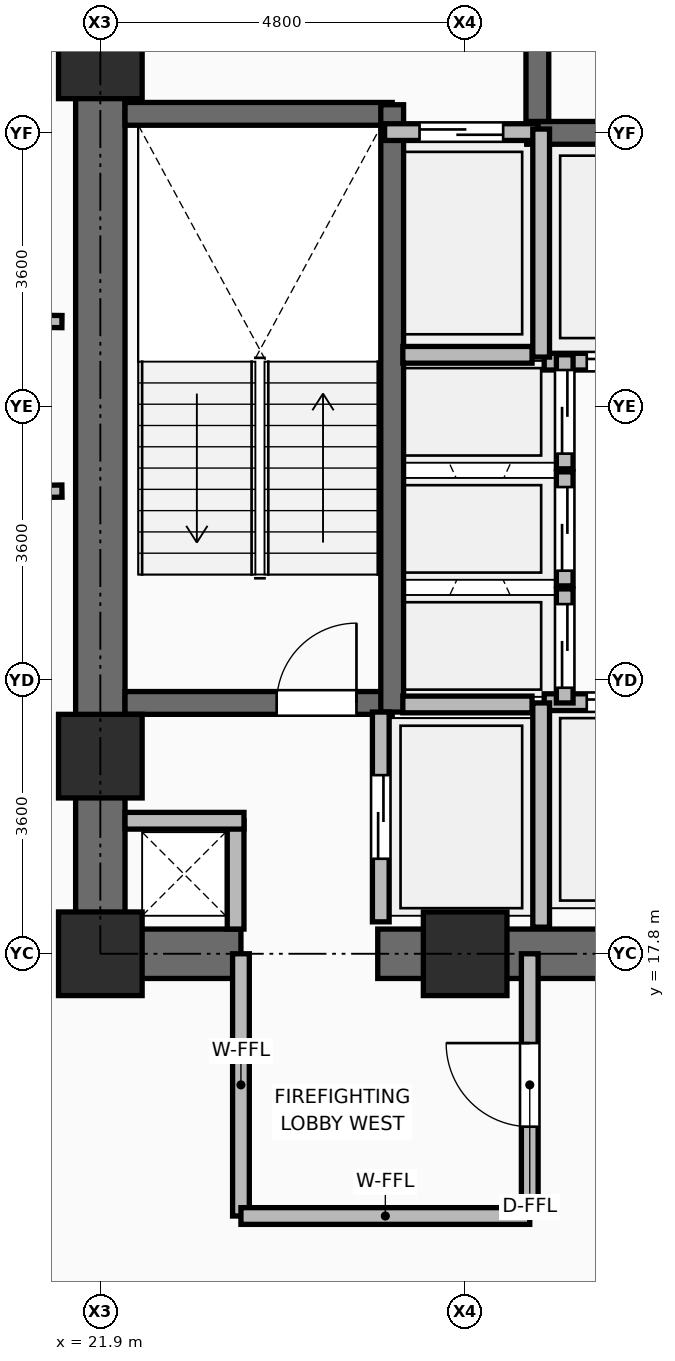
"""IFC4 building model, lengths in metres.
Left out: names, types, materials, properties, quantities, classifications, styles, units other than length and angle.
Written with IfcOpenShell. Run it as: python <this file> out.ifc"""

import sys

from ifc_helpers import new_model, si_unit, direction, frame, frame_2d, origin, origin_2d, place, context, subcontext, project, spatial, rectangle, extrude, element, fill, save


model = new_model("IFC4")
c1 = context("Model", 3, precision=1e-05, world=origin(), true_north=direction((0.0, 1.0)))
c2 = subcontext(c1, "Body", "Model", "MODEL_VIEW")
j1 = project(units=[si_unit("LENGTHUNIT", "METRE"), si_unit("PLANEANGLEUNIT", "RADIAN")], contexts=[c1])
p1 = place(None, origin())
s1 = spatial("IfcSite", under=j1, at=p1, CompositionType="ELEMENT")
p2 = place(p1, origin())
s2 = spatial("IfcBuilding", under=s1, at=p2, CompositionType="ELEMENT")
p3 = place(p2, frame((0.0, 0.0, 72.0)))
s3 = spatial("IfcBuildingStorey", under=s2, at=p3, CompositionType="ELEMENT", Elevation=72.0)
for number, where, z_axis, x_axis in (
    (1, (21.9, 17.8, 0.0), (0.0, 0.0, 1.0), (1.0, 0.0, 0.0)),
    (2, (26.7, 17.8, 0.0), (0.0, 0.0, 1.0), (1.0, 0.0, 0.0)),
    (3, (21.9, 20.4, 0.0), (0.0, 0.0, 1.0), (1.0, 0.0, 0.0)),
    (4, (21.9, 29.6, 0.0), (0.0, 0.0, 1.0), (1.0, 0.0, 0.0)),
):
    element("IfcColumn", number, at=place(p3, frame(where, z_axis=z_axis, x_axis=x_axis)), inside=s3, PredefinedType="COLUMN", context=c2, shape_type="SweptSolid", body=[
        extrude(rectangle(XDim=1.1, YDim=1.1, at=origin_2d()), origin(), (0.0, 0.0, 1.0), 3.75),
    ])
p4 = place(p3, frame((21.575, 17.8, 0.0), z_axis=(0.0, 0.0, 1.0), x_axis=(1.0, 0.0, 0.0)))
e5 = element("IfcWall", 5, at=p4, inside=s3, PredefinedType="SHEAR", context=c2, shape_type="SweptSolid", body=[
    extrude(rectangle(XDim=2.175, YDim=0.65, at=frame_2d((1.087, 0.0))), origin(), (0.0, 0.0, 1.0), 3.57),
])
p5 = place(p3, frame((25.55, 17.8, 0.0), z_axis=(0.0, 0.0, 1.0), x_axis=(1.0, 0.0, 0.0)))
e6 = element("IfcWall", 6, at=p5, inside=s3, PredefinedType="SHEAR", context=c2, shape_type="SweptSolid", body=[
    extrude(rectangle(XDim=6.9, YDim=0.65, at=frame_2d((3.45, 0.0))), origin(), (0.0, 0.0, 1.0), 3.57),
])
p6 = place(p3, frame((21.9, 18.125, 0.0), z_axis=(0.0, 0.0, 1.0), x_axis=(0.0, 1.0, 0.0)))
e7 = element("IfcWall", 7, at=p6, inside=s3, PredefinedType="SHEAR", context=c2, shape_type="SweptSolid", body=[
    extrude(rectangle(XDim=14.0, YDim=0.65, at=frame_2d((7.0, 0.0))), origin(), (0.0, 0.0, 1.0), 3.57),
])
p7 = place(p3, frame((22.225, 21.1, 0.0), z_axis=(0.0, 0.0, 1.0), x_axis=(1.0, 0.0, 0.0)))
e8 = element("IfcWall", 8, at=p7, inside=s3, PredefinedType="SHEAR", context=c2, shape_type="SweptSolid", body=[
    extrude(rectangle(XDim=3.515, YDim=0.3, at=frame_2d((1.757, 0.0))), origin(), (0.0, 0.0, 1.0), 3.57),
])
p8 = place(p7, frame((1.995, 0.0, 0.0)))
e9 = element("IfcOpeningElement", 9, at=p8, cuts=e8, PredefinedType="OPENING", context=c2, shape_type="SweptSolid", body=[
    extrude(rectangle(XDim=1.05, YDim=2.1, at=frame_2d((0.525, 1.05))), frame((0.0, 0.16, 0.0), z_axis=(0.0, -1.0, 0.0), x_axis=(1.0, 0.0, 0.0)), (0.0, 0.0, 1.0), 0.32),
])
p9 = place(p3, frame((22.225, 28.85, 0.0), z_axis=(0.0, 0.0, 1.0), x_axis=(1.0, 0.0, 0.0)))
e10 = element("IfcWall", 10, at=p9, inside=s3, PredefinedType="SHEAR", context=c2, shape_type="SweptSolid", body=[
    extrude(rectangle(XDim=3.515, YDim=0.3, at=frame_2d((1.757, 0.0))), origin(), (0.0, 0.0, 1.0), 3.57),
])
p10 = place(p3, frame((25.74, 20.98, 0.0), z_axis=(0.0, 0.0, 1.0), x_axis=(0.0, 1.0, 0.0)))
e11 = element("IfcWall", 11, at=p10, inside=s3, PredefinedType="SHEAR", context=c2, shape_type="SweptSolid", body=[
    extrude(rectangle(XDim=7.99, YDim=0.3, at=frame_2d((3.995, 0.0))), origin(), (0.0, 0.0, 1.0), 3.57),
])
p11 = place(p3, frame((27.51, 28.6, 0.0), z_axis=(0.0, 0.0, 1.0), x_axis=(1.0, 0.0, 0.0)))
e12 = element("IfcWall", 12, at=p11, inside=s3, PredefinedType="SHEAR", context=c2, shape_type="SweptSolid", body=[
    extrude(rectangle(XDim=8.03, YDim=0.3, at=frame_2d((4.015, 0.0))), origin(), (0.0, 0.0, 1.0), 3.57),
])
p12 = place(p3, frame((27.65, 28.75, 0.0), z_axis=(0.0, 0.0, 1.0), x_axis=(0.0, 1.0, 0.0)))
e13 = element("IfcWall", 13, at=p12, inside=s3, PredefinedType="SHEAR", context=c2, shape_type="SweptSolid", body=[
    extrude(rectangle(XDim=3.375, YDim=0.3, at=frame_2d((1.688, 0.0))), origin(), (0.0, 0.0, 1.0), 3.57),
])
p13 = place(p12, frame((1.0, 0.0, 0.0)))
e14 = element("IfcOpeningElement", 14, at=p13, cuts=e13, PredefinedType="OPENING", context=c2, shape_type="SweptSolid", body=[
    extrude(rectangle(XDim=1.05, YDim=2.1, at=frame_2d((0.525, 1.05))), frame((0.0, 0.16, 0.0), z_axis=(0.0, -1.0, 0.0), x_axis=(1.0, 0.0, 0.0)), (0.0, 0.0, 1.0), 0.32),
])
p14 = place(p3, frame((23.68, 18.125, 0.0), z_axis=(0.0, 0.0, 1.0), x_axis=(0.0, 1.0, 0.0)))
e15 = element("IfcWall", 15, at=p14, inside=s3, PredefinedType="PARTITIONING", context=c2, shape_type="SweptSolid", body=[
    extrude(rectangle(XDim=1.425, YDim=0.22, at=frame_2d((0.712, 0.0))), origin(), (0.0, 0.0, 1.0), 3.55),
])
p15 = place(p3, frame((22.225, 19.55, 0.0), z_axis=(0.0, 0.0, 1.0), x_axis=(1.0, 0.0, 0.0)))
e16 = element("IfcWall", 16, at=p15, inside=s3, PredefinedType="PARTITIONING", context=c2, shape_type="SweptSolid", body=[
    extrude(rectangle(XDim=1.565, YDim=0.22, at=frame_2d((0.782, 0.0))), origin(), (0.0, 0.0, 1.0), 2.595),
])
p16 = place(p3, frame((25.59, 18.22, 0.0), z_axis=(0.0, 0.0, 1.0), x_axis=(0.0, 1.0, 0.0)))
e17 = element("IfcWall", 17, at=p16, inside=s3, PredefinedType="PARTITIONING", context=c2, shape_type="SweptSolid", body=[
    extrude(rectangle(XDim=2.76, YDim=0.22, at=frame_2d((1.38, 0.0))), origin(), (0.0, 0.0, 1.0), 3.55),
])
p17 = place(p16, frame((0.83, 0.0, 0.0)))
e18 = element("IfcOpeningElement", 18, at=p17, cuts=e17, PredefinedType="OPENING", context=c2, shape_type="SweptSolid", body=[
    extrude(rectangle(XDim=1.1, YDim=2.2, at=frame_2d((0.55, 1.1))), frame((0.0, 0.12, 0.0), z_axis=(0.0, -1.0, 0.0), x_axis=(1.0, 0.0, 0.0)), (0.0, 0.0, 1.0), 0.24),
])
p18 = place(p3, frame((25.64, 28.61, 0.0), z_axis=(0.0, 0.0, 1.0), x_axis=(1.0, 0.0, 0.0)))
e19 = element("IfcWall", 19, at=p18, inside=s3, PredefinedType="PARTITIONING", context=c2, shape_type="SweptSolid", body=[
    extrude(rectangle(XDim=2.02, YDim=0.22, at=frame_2d((1.01, 0.0))), origin(), (0.0, 0.0, 1.0), 3.55),
])
p19 = place(p18, frame((0.46, 0.0, 0.0)))
e20 = element("IfcOpeningElement", 20, at=p19, cuts=e19, PredefinedType="OPENING", context=c2, shape_type="SweptSolid", body=[
    extrude(rectangle(XDim=1.1, YDim=2.2, at=frame_2d((0.55, 1.1))), frame((0.0, 0.12, 0.0), z_axis=(0.0, -1.0, 0.0), x_axis=(1.0, 0.0, 0.0)), (0.0, 0.0, 1.0), 0.24),
])
p20 = place(p3, frame((27.74, 21.11, 0.0), z_axis=(0.0, 0.0, 1.0), x_axis=(1.0, 0.0, 0.0)))
e21 = element("IfcWall", 21, at=p20, inside=s3, PredefinedType="PARTITIONING", context=c2, shape_type="SweptSolid", body=[
    extrude(rectangle(XDim=2.22, YDim=0.22, at=frame_2d((1.11, 0.0))), origin(), (0.0, 0.0, 1.0), 3.55),
])
p21 = place(p20, frame((0.56, 0.0, 0.0)))
e22 = element("IfcOpeningElement", 22, at=p21, cuts=e21, PredefinedType="OPENING", context=c2, shape_type="SweptSolid", body=[
    extrude(rectangle(XDim=1.1, YDim=2.2, at=frame_2d((0.55, 1.1))), frame((0.0, 0.12, 0.0), z_axis=(0.0, -1.0, 0.0), x_axis=(1.0, 0.0, 0.0)), (0.0, 0.0, 1.0), 0.24),
])
p22 = place(p3, frame((27.74, 25.59, 0.0), z_axis=(0.0, 0.0, 1.0), x_axis=(1.0, 0.0, 0.0)))
e23 = element("IfcWall", 23, at=p22, inside=s3, PredefinedType="PARTITIONING", context=c2, shape_type="SweptSolid", body=[
    extrude(rectangle(XDim=2.22, YDim=0.22, at=frame_2d((1.11, 0.0))), origin(), (0.0, 0.0, 1.0), 3.55),
])
p23 = place(p22, frame((0.56, 0.0, 0.0)))
e24 = element("IfcOpeningElement", 24, at=p23, cuts=e23, PredefinedType="OPENING", context=c2, shape_type="SweptSolid", body=[
    extrude(rectangle(XDim=1.1, YDim=2.2, at=frame_2d((0.55, 1.1))), frame((0.0, 0.12, 0.0), z_axis=(0.0, -1.0, 0.0), x_axis=(1.0, 0.0, 0.0)), (0.0, 0.0, 1.0), 0.24),
])
p24 = place(p3, frame((28.01, 21.1, 0.0), z_axis=(0.0, 0.0, 1.0), x_axis=(0.0, 1.0, 0.0)))
e25 = element("IfcWall", 25, at=p24, inside=s3, PredefinedType="PARTITIONING", context=c2, shape_type="SweptSolid", body=[
    extrude(rectangle(XDim=1.5, YDim=0.22, at=frame_2d((0.75, 0.0))), origin(), (0.0, 0.0, 1.0), 3.55),
])
p25 = place(p24, frame((0.2, 0.0, 0.0)))
e26 = element("IfcOpeningElement", 26, at=p25, cuts=e25, PredefinedType="OPENING", context=c2, shape_type="SweptSolid", body=[
    extrude(rectangle(XDim=1.1, YDim=2.2, at=frame_2d((0.55, 1.1))), frame((0.0, 0.12, 0.0), z_axis=(0.0, -1.0, 0.0), x_axis=(1.0, 0.0, 0.0)), (0.0, 0.0, 1.0), 0.24),
])
p26 = place(p3, frame((28.01, 22.64, 0.0), z_axis=(0.0, 0.0, 1.0), x_axis=(0.0, 1.0, 0.0)))
e27 = element("IfcWall", 27, at=p26, inside=s3, PredefinedType="PARTITIONING", context=c2, shape_type="SweptSolid", body=[
    extrude(rectangle(XDim=1.5, YDim=0.22, at=frame_2d((0.75, 0.0))), origin(), (0.0, 0.0, 1.0), 3.55),
])
p27 = place(p26, frame((0.2, 0.0, 0.0)))
e28 = element("IfcOpeningElement", 28, at=p27, cuts=e27, PredefinedType="OPENING", context=c2, shape_type="SweptSolid", body=[
    extrude(rectangle(XDim=1.1, YDim=2.2, at=frame_2d((0.55, 1.1))), frame((0.0, 0.12, 0.0), z_axis=(0.0, -1.0, 0.0), x_axis=(1.0, 0.0, 0.0)), (0.0, 0.0, 1.0), 0.24),
])
p28 = place(p3, frame((28.01, 24.18, 0.0), z_axis=(0.0, 0.0, 1.0), x_axis=(0.0, 1.0, 0.0)))
e29 = element("IfcWall", 29, at=p28, inside=s3, PredefinedType="PARTITIONING", context=c2, shape_type="SweptSolid", body=[
    extrude(rectangle(XDim=1.5, YDim=0.22, at=frame_2d((0.75, 0.0))), origin(), (0.0, 0.0, 1.0), 3.55),
])
p29 = place(p28, frame((0.2, 0.0, 0.0)))
e30 = element("IfcOpeningElement", 30, at=p29, cuts=e29, PredefinedType="OPENING", context=c2, shape_type="SweptSolid", body=[
    extrude(rectangle(XDim=1.1, YDim=2.2, at=frame_2d((0.55, 1.1))), frame((0.0, 0.12, 0.0), z_axis=(0.0, -1.0, 0.0), x_axis=(1.0, 0.0, 0.0)), (0.0, 0.0, 1.0), 0.24),
])
p30 = place(p3, frame((27.7, 18.15, 0.0), z_axis=(0.0, 0.0, 1.0), x_axis=(0.0, 1.0, 0.0)))
e31 = element("IfcWall", 31, at=p30, inside=s3, PredefinedType="PARTITIONING", context=c2, shape_type="SweptSolid", body=[
    extrude(rectangle(XDim=2.95, YDim=0.22, at=frame_2d((1.475, 0.0))), origin(), (0.0, 0.0, 1.0), 3.55),
])
p31 = place(p3, frame((27.7, 25.65, 0.0), z_axis=(0.0, 0.0, 1.0), x_axis=(0.0, 1.0, 0.0)))
e32 = element("IfcWall", 32, at=p31, inside=s3, PredefinedType="PARTITIONING", context=c2, shape_type="SweptSolid", body=[
    extrude(rectangle(XDim=3.0, YDim=0.22, at=frame_2d((1.5, 0.0))), origin(), (0.0, 0.0, 1.0), 3.55),
])
for number, where, z_axis, x_axis in (
    (33, (25.88, 21.08, 0.0), (0.0, 0.0, 1.0), (1.0, 0.0, 0.0)),
    (34, (25.88, 25.68, 0.0), (0.0, 0.0, 1.0), (1.0, 0.0, 0.0)),
):
    element("IfcWall", number, at=place(p3, frame(where, z_axis=z_axis, x_axis=x_axis)), inside=s3, PredefinedType="PARTITIONING", context=c2, shape_type="SweptSolid", body=[
        extrude(rectangle(XDim=1.7, YDim=0.22, at=frame_2d((0.85, 0.0))), origin(), (0.0, 0.0, 1.0), 3.55),
    ])
p32 = place(p3, frame((23.75, 14.35, 0.0), z_axis=(0.0, 0.0, 1.0), x_axis=(0.0, 1.0, 0.0)))
e35 = element("IfcWall", 35, at=p32, inside=s3, PredefinedType="PARTITIONING", context=c2, shape_type="SweptSolid", body=[
    extrude(rectangle(XDim=3.45, YDim=0.22, at=frame_2d((1.725, 0.0))), origin(), (0.0, 0.0, 1.0), 2.928),
])
p33 = place(p3, frame((23.75, 14.35, 0.0), z_axis=(0.0, 0.0, 1.0), x_axis=(1.0, 0.0, 0.0)))
e36 = element("IfcWall", 36, at=p33, inside=s3, PredefinedType="PARTITIONING", context=c2, shape_type="SweptSolid", body=[
    extrude(rectangle(XDim=3.8, YDim=0.22, at=frame_2d((1.9, 0.0))), origin(), (0.0, 0.0, 1.0), 3.55),
])
p34 = place(p3, frame((27.55, 14.35, 0.0), z_axis=(0.0, 0.0, 1.0), x_axis=(0.0, 1.0, 0.0)))
e37 = element("IfcWall", 37, at=p34, inside=s3, PredefinedType="PARTITIONING", context=c2, shape_type="SweptSolid", body=[
    extrude(rectangle(XDim=3.45, YDim=0.22, at=frame_2d((1.725, 0.0))), origin(), (0.0, 0.0, 1.0), 2.928),
])
p35 = place(p34, frame((1.175, 0.0, 0.0)))
e38 = element("IfcOpeningElement", 38, at=p35, cuts=e37, PredefinedType="OPENING", context=c2, shape_type="SweptSolid", body=[
    extrude(rectangle(XDim=1.1, YDim=2.1, at=frame_2d((0.55, 1.05))), frame((0.0, 0.12, 0.0), z_axis=(0.0, -1.0, 0.0), x_axis=(1.0, 0.0, 0.0)), (0.0, 0.0, 1.0), 0.24),
])
p36 = place(p3, frame((21.395, 26.117, 0.0), z_axis=(0.0, 0.0, 1.0), x_axis=(-0.999934504226, 0.011444966545, 0.0)))
e39 = element("IfcWall", 39, at=p36, inside=s3, PredefinedType="PARTITIONING", context=c2, shape_type="SweptSolid", body=[
    extrude(rectangle(XDim=2.197, YDim=0.16, at=frame_2d((1.099, 0.0))), origin(), (0.0, 0.0, 1.0), 3.55),
])
p37 = place(p3, frame((19.198, 23.858, 0.0), z_axis=(0.0, 0.0, 1.0), x_axis=(0.999912578456, 0.013222535486, 0.0)))
e40 = element("IfcWall", 40, at=p37, inside=s3, PredefinedType="PARTITIONING", context=c2, shape_type="SweptSolid", body=[
    extrude(rectangle(XDim=2.197, YDim=0.16, at=frame_2d((1.099, 0.0))), origin(), (0.0, 0.0, 1.0), 3.55),
])
p38 = place(p37, frame((0.837, 0.0, 0.0)))
e41 = element("IfcOpeningElement", 41, at=p38, cuts=e40, PredefinedType="OPENING", context=c2, shape_type="SweptSolid", body=[
    extrude(rectangle(XDim=1.2, YDim=2.1, at=frame_2d((0.6, 1.05))), frame((0.0, 0.09, 0.0), z_axis=(0.0, -1.0, 0.0), x_axis=(1.0, 0.0, 0.0)), (0.0, 0.0, 1.0), 0.18),
])
p39 = place(p8, origin())
e42 = element("IfcDoor", 42, at=p39, inside=s3, OperationType="SINGLE_SWING_RIGHT", PredefinedType="DOOR", context=c2, shape_type="SweptSolid", body=[
    extrude(rectangle(XDim=1.05, YDim=2.1, at=frame_2d((0.525, 1.05))), frame((0.0, 0.025, 0.0), z_axis=(0.0, -1.0, 0.0), x_axis=(1.0, 0.0, 0.0)), (0.0, 0.0, 1.0), 0.05),
])
fill(e9, e42)
p40 = place(p17, origin())
e43 = element("IfcDoor", 43, at=p40, inside=s3, OperationType="DOUBLE_DOOR_SLIDING", PredefinedType="DOOR", context=c2, shape_type="SweptSolid", body=[
    extrude(rectangle(XDim=1.1, YDim=2.2, at=frame_2d((0.55, 1.1))), frame((0.0, 0.025, 0.0), z_axis=(0.0, -1.0, 0.0), x_axis=(1.0, 0.0, 0.0)), (0.0, 0.0, 1.0), 0.05),
])
fill(e18, e43)
p41 = place(p19, origin())
e44 = element("IfcDoor", 44, at=p41, inside=s3, OperationType="DOUBLE_DOOR_SLIDING", PredefinedType="DOOR", context=c2, shape_type="SweptSolid", body=[
    extrude(rectangle(XDim=1.1, YDim=2.2, at=frame_2d((0.55, 1.1))), frame((0.0, 0.025, 0.0), z_axis=(0.0, -1.0, 0.0), x_axis=(1.0, 0.0, 0.0)), (0.0, 0.0, 1.0), 0.05),
])
fill(e20, e44)
p42 = place(p21, origin())
e45 = element("IfcDoor", 45, at=p42, inside=s3, OperationType="DOUBLE_DOOR_SLIDING", PredefinedType="DOOR", context=c2, shape_type="SweptSolid", body=[
    extrude(rectangle(XDim=1.1, YDim=2.2, at=frame_2d((0.55, 1.1))), frame((0.0, 0.025, 0.0), z_axis=(0.0, -1.0, 0.0), x_axis=(1.0, 0.0, 0.0)), (0.0, 0.0, 1.0), 0.05),
])
fill(e22, e45)
p43 = place(p23, frame((1.1, 0.0, 0.0), z_axis=(0.0, 0.0, 1.0), x_axis=(-1.0, 0.0, 0.0)))
e46 = element("IfcDoor", 46, at=p43, inside=s3, OperationType="DOUBLE_DOOR_SLIDING", PredefinedType="DOOR", context=c2, shape_type="SweptSolid", body=[
    extrude(rectangle(XDim=1.1, YDim=2.2, at=frame_2d((0.55, 1.1))), frame((0.0, 0.025, 0.0), z_axis=(0.0, -1.0, 0.0), x_axis=(1.0, 0.0, 0.0)), (0.0, 0.0, 1.0), 0.05),
])
fill(e24, e46)
p44 = place(p25, frame((1.1, 0.0, 0.0), z_axis=(0.0, 0.0, 1.0), x_axis=(-1.0, 0.0, 0.0)))
e47 = element("IfcDoor", 47, at=p44, inside=s3, OperationType="DOUBLE_DOOR_SLIDING", PredefinedType="DOOR", context=c2, shape_type="SweptSolid", body=[
    extrude(rectangle(XDim=1.1, YDim=2.2, at=frame_2d((0.55, 1.1))), frame((0.0, 0.025, 0.0), z_axis=(0.0, -1.0, 0.0), x_axis=(1.0, 0.0, 0.0)), (0.0, 0.0, 1.0), 0.05),
])
fill(e26, e47)
p45 = place(p27, frame((1.1, 0.0, 0.0), z_axis=(0.0, 0.0, 1.0), x_axis=(-1.0, 0.0, 0.0)))
e48 = element("IfcDoor", 48, at=p45, inside=s3, OperationType="DOUBLE_DOOR_SLIDING", PredefinedType="DOOR", context=c2, shape_type="SweptSolid", body=[
    extrude(rectangle(XDim=1.1, YDim=2.2, at=frame_2d((0.55, 1.1))), frame((0.0, 0.025, 0.0), z_axis=(0.0, -1.0, 0.0), x_axis=(1.0, 0.0, 0.0)), (0.0, 0.0, 1.0), 0.05),
])
fill(e28, e48)
p46 = place(p29, frame((1.1, 0.0, 0.0), z_axis=(0.0, 0.0, 1.0), x_axis=(-1.0, 0.0, 0.0)))
e49 = element("IfcDoor", 49, at=p46, inside=s3, OperationType="DOUBLE_DOOR_SLIDING", PredefinedType="DOOR", context=c2, shape_type="SweptSolid", body=[
    extrude(rectangle(XDim=1.1, YDim=2.2, at=frame_2d((0.55, 1.1))), frame((0.0, 0.025, 0.0), z_axis=(0.0, -1.0, 0.0), x_axis=(1.0, 0.0, 0.0)), (0.0, 0.0, 1.0), 0.05),
])
fill(e30, e49)
p47 = place(p35, origin())
e50 = element("IfcDoor", 50, at=p47, inside=s3, OperationType="SINGLE_SWING_RIGHT", PredefinedType="DOOR", context=c2, shape_type="SweptSolid", body=[
    extrude(rectangle(XDim=1.1, YDim=2.1, at=frame_2d((0.55, 1.05))), frame((0.0, 0.025, 0.0), z_axis=(0.0, -1.0, 0.0), x_axis=(1.0, 0.0, 0.0)), (0.0, 0.0, 1.0), 0.05),
])
fill(e38, e50)
save(model, sys.argv[1])
